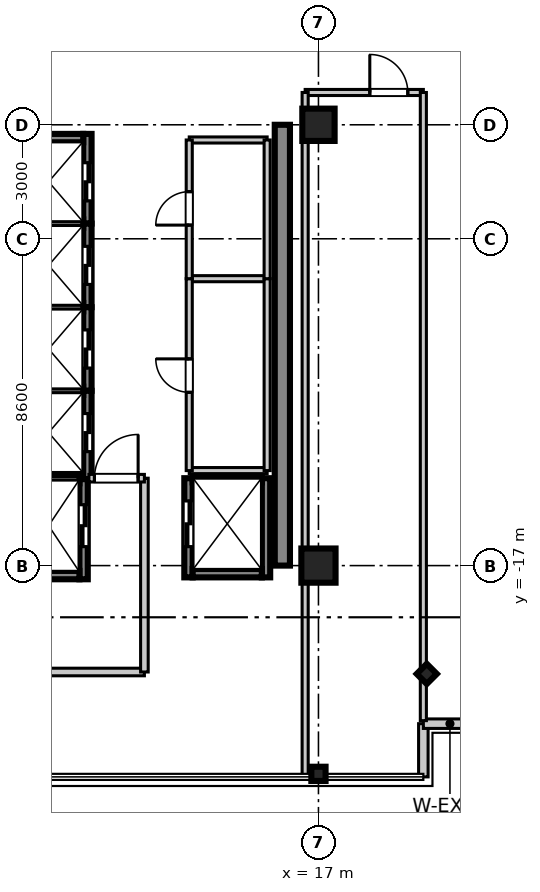
"""IFC4 building model, lengths in metres.
Left out: names, types, materials, properties, quantities, classifications, styles, units other than length and angle.
Written with IfcOpenShell. Run it as: python <this file> out.ifc"""

import sys

from ifc_helpers import new_model, si_unit, direction, frame, frame_2d, origin, origin_2d, place, context, subcontext, project, spatial, rectangle, i_section, extrude, source, transform, mapped, element, fill, save


model = new_model("IFC4")
c1 = context("Model", 3, precision=1e-05, world=origin(), true_north=direction((0.0, 1.0)))
c2 = subcontext(c1, "Body", "Model", "MODEL_VIEW")
j1 = project(units=[si_unit("LENGTHUNIT", "METRE"), si_unit("PLANEANGLEUNIT", "RADIAN")], contexts=[c1])
p1 = place(None, origin())
s1 = spatial("IfcSite", under=j1, at=p1, CompositionType="ELEMENT")
p2 = place(p1, origin())
s2 = spatial("IfcBuilding", under=s1, at=p2, CompositionType="ELEMENT")
p3 = place(p2, frame((0.0, 0.0, 304.2)))
s3 = spatial("IfcBuildingStorey", under=s2, at=p3, CompositionType="ELEMENT", Elevation=304.2)
m1 = source(origin(), c2, "Body", "SweptSolid", [
    extrude(rectangle(XDim=0.9, YDim=0.9, at=origin_2d()), origin(), (0.0, 0.0, 1.0), 3.805),
])
p4 = place(p3, frame((17.0, -17.0, 0.0), z_axis=(0.0, 0.0, 1.0), x_axis=(1.0, 0.0, 0.0)))
e1 = element("IfcColumn", 1, at=p4, inside=s3, PredefinedType="COLUMN", context=c2, shape_type="MappedRepresentation", body=[
    mapped(m1, transform((0.0, 0.0, 0.0), scale=1.0)),
])
m2 = source(origin(), c2, "Body", "SweptSolid", [
    extrude(rectangle(XDim=0.85, YDim=0.85, at=origin_2d()), origin(), (0.0, 0.0, 1.0), 3.805),
])
p5 = place(p3, frame((17.0, -5.4, 0.0), z_axis=(0.0, 0.0, 1.0), x_axis=(1.0, 0.0, 0.0)))
e2 = element("IfcColumn", 2, at=p5, inside=s3, PredefinedType="PILASTER", context=c2, shape_type="MappedRepresentation", body=[
    mapped(m2, transform((0.0, 0.0, 0.0), scale=1.0)),
])
m3 = source(origin(), c2, "Body", "SweptSolid", [
    extrude(i_section(OverallWidth=0.374, OverallDepth=0.374, WebThickness=0.014, FlangeThickness=0.023, at=origin_2d()), origin(), (0.0, 0.0, 1.0), 3.805),
])
for number, where, z_axis, x_axis in (
    (3, (17.0, -22.48, 0.0), (0.0, 0.0, 1.0), (0.0, 1.0, 0.0)),
    (4, (19.85, -19.85, 0.0), (0.0, 0.0, 1.0), (0.707, 0.707, 0.0)),
):
    element("IfcColumn", number, at=place(p3, frame(where, z_axis=z_axis, x_axis=x_axis)), inside=s3, PredefinedType="COLUMN", context=c2, shape_type="MappedRepresentation", body=[
        mapped(m3, transform((0.0, 0.0, 0.0), scale=1.0)),
    ])
m4 = source(origin(), c2, "Body", "SweptSolid", [
    extrude(rectangle(XDim=11.6, YDim=0.4, at=frame_2d((5.8, 0.0))), origin(), (0.0, 0.0, 1.0), 3.55),
])
p6 = place(p3, frame((16.05, -17.0, 0.0), z_axis=(0.0, 0.0, 1.0), x_axis=(0.0, 1.0, 0.0)))
e5 = element("IfcWall", 5, at=p6, inside=s3, PredefinedType="SHEAR", context=c2, shape_type="MappedRepresentation", body=[
    mapped(m4, transform((0.0, 0.0, 0.0), scale=1.0)),
])
m5 = source(origin(), c2, "Body", "SweptSolid", [
    extrude(rectangle(XDim=2.36, YDim=0.22, at=frame_2d((1.18, 0.0))), origin(), (0.0, 0.0, 1.0), 3.55),
])
p7 = place(p3, frame((10.92, -8.0, 0.0), z_axis=(0.0, 0.0, 1.0), x_axis=(0.0, 1.0, 0.0)))
e6 = element("IfcWall", 6, at=p7, inside=s3, PredefinedType="SHEAR", context=c2, shape_type="MappedRepresentation", body=[
    mapped(m5, transform((0.0, 0.0, 0.0), scale=1.0)),
])
p8 = place(p7, frame((0.6, 0.0, 0.0)))
e7 = element("IfcOpeningElement", 7, at=p8, cuts=e6, PredefinedType="OPENING", context=c2, shape_type="SweptSolid", body=[
    extrude(rectangle(XDim=1.0, YDim=2.2, at=frame_2d((0.5, 1.1))), frame((0.0, 0.12, 0.0), z_axis=(0.0, -1.0, 0.0), x_axis=(1.0, 0.0, 0.0)), (0.0, 0.0, 1.0), 0.24),
])
m6 = source(origin(), c2, "Body", "SweptSolid", [
    extrude(rectangle(XDim=1.82, YDim=0.22, at=frame_2d((0.91, 0.0))), origin(), (0.0, 0.0, 1.0), 3.55),
])
p9 = place(p3, frame((8.99, -5.75, 0.0), z_axis=(0.0, 0.0, 1.0), x_axis=(1.0, 0.0, 0.0)))
e8 = element("IfcWall", 8, at=p9, inside=s3, PredefinedType="SHEAR", context=c2, shape_type="MappedRepresentation", body=[
    mapped(m6, transform((0.0, 0.0, 0.0), scale=1.0)),
])
m7 = source(origin(), c2, "Body", "SweptSolid", [
    extrude(rectangle(XDim=2.2, YDim=0.22, at=frame_2d((1.1, 0.0))), origin(), (0.0, 0.0, 1.0), 3.55),
])
p10 = place(p3, frame((10.92, -10.2, 0.0), z_axis=(0.0, 0.0, 1.0), x_axis=(0.0, 1.0, 0.0)))
e9 = element("IfcWall", 9, at=p10, inside=s3, PredefinedType="SHEAR", context=c2, shape_type="MappedRepresentation", body=[
    mapped(m7, transform((0.0, 0.0, 0.0), scale=1.0)),
])
p11 = place(p10, frame((0.6, 0.0, 0.0)))
e10 = element("IfcOpeningElement", 10, at=p11, cuts=e9, PredefinedType="OPENING", context=c2, shape_type="SweptSolid", body=[
    extrude(rectangle(XDim=1.0, YDim=2.2, at=frame_2d((0.5, 1.1))), frame((0.0, 0.12, 0.0), z_axis=(0.0, -1.0, 0.0), x_axis=(1.0, 0.0, 0.0)), (0.0, 0.0, 1.0), 0.24),
])
m8 = source(origin(), c2, "Body", "SweptSolid", [
    extrude(rectangle(XDim=1.82, YDim=0.22, at=frame_2d((0.91, 0.0))), origin(), (0.0, 0.0, 1.0), 3.85),
])
p12 = place(p3, frame((8.99, -8.0, 0.0), z_axis=(0.0, 0.0, 1.0), x_axis=(1.0, 0.0, 0.0)))
e11 = element("IfcWall", 11, at=p12, inside=s3, PredefinedType="SHEAR", context=c2, shape_type="MappedRepresentation", body=[
    mapped(m8, transform((0.0, 0.0, 0.0), scale=1.0)),
])
p13 = place(p3, frame((10.92, -12.4, 0.0), z_axis=(0.0, 0.0, 1.0), x_axis=(0.0, 1.0, 0.0)))
e12 = element("IfcWall", 12, at=p13, inside=s3, PredefinedType="SHEAR", context=c2, shape_type="MappedRepresentation", body=[
    mapped(m7, transform((0.0, 0.0, 0.0), scale=1.0)),
])
p14 = place(p13, frame((0.6, 0.0, 0.0)))
e13 = element("IfcOpeningElement", 13, at=p14, cuts=e12, PredefinedType="OPENING", context=c2, shape_type="SweptSolid", body=[
    extrude(rectangle(XDim=1.0, YDim=2.2, at=frame_2d((0.5, 1.1))), frame((0.0, 0.12, 0.0), z_axis=(0.0, -1.0, 0.0), x_axis=(1.0, 0.0, 0.0)), (0.0, 0.0, 1.0), 0.24),
])
p15 = place(p3, frame((8.99, -10.2, 0.0), z_axis=(0.0, 0.0, 1.0), x_axis=(1.0, 0.0, 0.0)))
e14 = element("IfcWall", 14, at=p15, inside=s3, PredefinedType="SHEAR", context=c2, shape_type="MappedRepresentation", body=[
    mapped(m8, transform((0.0, 0.0, 0.0), scale=1.0)),
])
m9 = source(origin(), c2, "Body", "SweptSolid", [
    extrude(rectangle(XDim=2.325, YDim=0.22, at=frame_2d((1.163, 0.0))), origin(), (0.0, 0.0, 1.0), 3.55),
])
p16 = place(p3, frame((10.92, -14.725, 0.0), z_axis=(0.0, 0.0, 1.0), x_axis=(0.0, 1.0, 0.0)))
e15 = element("IfcWall", 15, at=p16, inside=s3, PredefinedType="SHEAR", context=c2, shape_type="MappedRepresentation", body=[
    mapped(m9, transform((0.0, 0.0, 0.0), scale=1.0)),
])
p17 = place(p16, frame((0.725, 0.0, 0.0)))
e16 = element("IfcOpeningElement", 16, at=p17, cuts=e15, PredefinedType="OPENING", context=c2, shape_type="SweptSolid", body=[
    extrude(rectangle(XDim=1.0, YDim=2.2, at=frame_2d((0.5, 1.1))), frame((0.0, 0.12, 0.0), z_axis=(0.0, -1.0, 0.0), x_axis=(1.0, 0.0, 0.0)), (0.0, 0.0, 1.0), 0.24),
])
p18 = place(p3, frame((8.99, -12.4, 0.0), z_axis=(0.0, 0.0, 1.0), x_axis=(1.0, 0.0, 0.0)))
e17 = element("IfcWall", 17, at=p18, inside=s3, PredefinedType="SHEAR", context=c2, shape_type="MappedRepresentation", body=[
    mapped(m8, transform((0.0, 0.0, 0.0), scale=1.0)),
])
m10 = source(origin(), c2, "Body", "SweptSolid", [
    extrude(rectangle(XDim=2.635, YDim=0.22, at=frame_2d((1.317, 0.0))), origin(), (0.0, 0.0, 1.0), 3.55),
])
p19 = place(p3, frame((10.82, -17.36, 0.0), z_axis=(0.0, 0.0, 1.0), x_axis=(0.0, 1.0, 0.0)))
e18 = element("IfcWall", 18, at=p19, inside=s3, PredefinedType="SHEAR", context=c2, shape_type="MappedRepresentation", body=[
    mapped(m10, transform((0.0, 0.0, 0.0), scale=1.0)),
])
p20 = place(p19, frame((0.86, 0.0, 0.0)))
e19 = element("IfcOpeningElement", 19, at=p20, cuts=e18, PredefinedType="OPENING", context=c2, shape_type="SweptSolid", body=[
    extrude(rectangle(XDim=1.1, YDim=2.2, at=frame_2d((0.55, 1.1))), frame((0.0, 0.12, 0.0), z_axis=(0.0, -1.0, 0.0), x_axis=(1.0, 0.0, 0.0)), (0.0, 0.0, 1.0), 0.24),
])
m11 = source(origin(), c2, "Body", "SweptSolid", [
    extrude(rectangle(XDim=1.62, YDim=0.22, at=frame_2d((0.81, 0.0))), origin(), (0.0, 0.0, 1.0), 3.55),
])
p21 = place(p3, frame((9.09, -17.25, 0.0), z_axis=(0.0, 0.0, 1.0), x_axis=(1.0, 0.0, 0.0)))
e20 = element("IfcWall", 20, at=p21, inside=s3, PredefinedType="SHEAR", context=c2, shape_type="MappedRepresentation", body=[
    mapped(m11, transform((0.0, 0.0, 0.0), scale=1.0)),
])
m12 = source(origin(), c2, "Body", "SweptSolid", [
    extrude(rectangle(XDim=1.62, YDim=0.22, at=frame_2d((0.81, 0.0))), origin(), (0.0, 0.0, 1.0), 3.85),
])
p22 = place(p3, frame((9.09, -14.725, 0.0), z_axis=(0.0, 0.0, 1.0), x_axis=(1.0, 0.0, 0.0)))
e21 = element("IfcWall", 21, at=p22, inside=s3, PredefinedType="SHEAR", context=c2, shape_type="MappedRepresentation", body=[
    mapped(m12, transform((0.0, 0.0, 0.0), scale=1.0)),
])
m13 = source(origin(), c2, "Body", "SweptSolid", [
    extrude(rectangle(XDim=2.61, YDim=0.22, at=frame_2d((1.305, 0.0))), origin(), (0.0, 0.0, 1.0), 3.55),
])
p23 = place(p3, frame((13.58, -17.31, 0.0), z_axis=(0.0, 0.0, 1.0), x_axis=(0.0, 1.0, 0.0)))
e22 = element("IfcWall", 22, at=p23, inside=s3, PredefinedType="SHEAR", context=c2, shape_type="MappedRepresentation", body=[
    mapped(m13, transform((0.0, 0.0, 0.0), scale=1.0)),
])
p24 = place(p23, frame((0.81, 0.0, 0.0)))
e23 = element("IfcOpeningElement", 23, at=p24, cuts=e22, PredefinedType="OPENING", context=c2, shape_type="SweptSolid", body=[
    extrude(rectangle(XDim=1.2, YDim=2.2, at=frame_2d((0.6, 1.1))), frame((0.0, 0.12, 0.0), z_axis=(0.0, -1.0, 0.0), x_axis=(1.0, 0.0, 0.0)), (0.0, 0.0, 1.0), 0.24),
])
p25 = place(p3, frame((15.62, -17.31, 0.0), z_axis=(0.0, 0.0, 1.0), x_axis=(0.0, 1.0, 0.0)))
e24 = element("IfcWall", 24, at=p25, inside=s3, PredefinedType="SHEAR", context=c2, shape_type="MappedRepresentation", body=[
    mapped(m13, transform((0.0, 0.0, 0.0), scale=1.0)),
])
p26 = place(p3, frame((13.69, -17.2, 0.0), z_axis=(0.0, 0.0, 1.0), x_axis=(1.0, 0.0, 0.0)))
e25 = element("IfcWall", 25, at=p26, inside=s3, PredefinedType="SHEAR", context=c2, shape_type="MappedRepresentation", body=[
    mapped(m6, transform((0.0, 0.0, 0.0), scale=1.0)),
])
p27 = place(p3, frame((13.69, -14.7, 0.0), z_axis=(0.0, 0.0, 1.0), x_axis=(1.0, 0.0, 0.0)))
e26 = element("IfcWall", 26, at=p27, inside=s3, PredefinedType="SHEAR", context=c2, shape_type="MappedRepresentation", body=[
    mapped(m8, transform((0.0, 0.0, 0.0), scale=1.0)),
])
m14 = source(origin(), c2, "Body", "SweptSolid", [
    extrude(rectangle(XDim=1.4, YDim=0.25, at=frame_2d((0.7, 0.0))), origin(), (0.0, 0.0, 1.0), 3.55),
])
p28 = place(p3, frame((19.76, -22.56, 0.0), z_axis=(0.0, 0.0, 1.0), x_axis=(0.0, 1.0, 0.0)))
e27 = element("IfcWall", 27, at=p28, inside=s3, PredefinedType="STANDARD", context=c2, shape_type="MappedRepresentation", body=[
    mapped(m14, transform((0.0, 0.0, 0.0), scale=1.0)),
])
m15 = source(origin(), c2, "Body", "SweptSolid", [
    extrude(rectangle(XDim=1.4, YDim=0.25, at=frame_2d((0.7, 0.0))), origin(), (0.0, 0.0, 1.0), 3.55),
])
p29 = place(p3, frame((19.76, -21.16, 0.0), z_axis=(0.0, 0.0, 1.0), x_axis=(1.0, 0.0, 0.0)))
e28 = element("IfcWall", 28, at=p29, inside=s3, PredefinedType="STANDARD", context=c2, shape_type="MappedRepresentation", body=[
    mapped(m15, transform((0.0, 0.0, 0.0), scale=1.0)),
])
m16 = source(origin(), c2, "Body", "SweptSolid", [
    extrude(rectangle(XDim=5.82, YDim=0.2, at=frame_2d((2.91, 0.0))), origin(), (0.0, 0.0, 1.0), 2.89),
])
p30 = place(p3, frame((6.6, -19.8, 0.0), z_axis=(0.0, 0.0, 1.0), x_axis=(1.0, 0.0, 0.0)))
e29 = element("IfcWall", 29, at=p30, inside=s3, PredefinedType="PARTITIONING", context=c2, shape_type="MappedRepresentation", body=[
    mapped(m16, transform((0.0, 0.0, 0.0), scale=1.0)),
])
m17 = source(origin(), c2, "Body", "SweptSolid", [
    extrude(rectangle(XDim=5.1, YDim=0.2, at=frame_2d((2.55, 0.0))), origin(), (0.0, 0.0, 1.0), 2.89),
])
p31 = place(p3, frame((12.42, -19.8, 0.0), z_axis=(0.0, 0.0, 1.0), x_axis=(0.0, 1.0, 0.0)))
e30 = element("IfcWall", 30, at=p31, inside=s3, PredefinedType="PARTITIONING", context=c2, shape_type="MappedRepresentation", body=[
    mapped(m17, transform((0.0, 0.0, 0.0), scale=1.0)),
])
m18 = source(origin(), c2, "Body", "SweptSolid", [
    extrude(rectangle(XDim=1.46, YDim=0.2, at=frame_2d((0.73, 0.0))), origin(), (0.0, 0.0, 1.0), 2.89),
])
p32 = place(p3, frame((10.96, -14.7, 0.0), z_axis=(0.0, 0.0, 1.0), x_axis=(1.0, 0.0, 0.0)))
e31 = element("IfcWall", 31, at=p32, inside=s3, PredefinedType="PARTITIONING", context=c2, shape_type="MappedRepresentation", body=[
    mapped(m18, transform((0.0, 0.0, 0.0), scale=1.0)),
])
p33 = place(p32, frame((0.145, 0.0, 0.0)))
e32 = element("IfcOpeningElement", 32, at=p33, cuts=e31, PredefinedType="OPENING", context=c2, shape_type="SweptSolid", body=[
    extrude(rectangle(XDim=1.15, YDim=2.15, at=frame_2d((0.575, 1.075))), frame((0.0, 0.11, 0.0), z_axis=(0.0, -1.0, 0.0), x_axis=(1.0, 0.0, 0.0)), (0.0, 0.0, 1.0), 0.22),
])
m19 = source(origin(), c2, "Body", "SweptSolid", [
    extrude(rectangle(XDim=2.05, YDim=0.16, at=frame_2d((1.025, 0.0))), origin(), (0.0, 0.0, 1.0), 2.89),
])
for number, where, z_axis, x_axis in (
    (33, (13.6, -14.5, 0.0), (0.0, 0.0, 1.0), (1.0, 0.0, 0.0)),
    (34, (13.6, -9.45, 0.0), (0.0, 0.0, 1.0), (1.0, 0.0, 0.0)),
):
    element("IfcWall", number, at=place(p3, frame(where, z_axis=z_axis, x_axis=x_axis)), inside=s3, PredefinedType="PARTITIONING", context=c2, shape_type="MappedRepresentation", body=[
        mapped(m19, transform((0.0, 0.0, 0.0), scale=1.0)),
    ])
m20 = source(origin(), c2, "Body", "SweptSolid", [
    extrude(rectangle(XDim=5.05, YDim=0.16, at=frame_2d((2.525, 0.0))), origin(), (0.0, 0.0, 1.0), 2.89),
])
p34 = place(p3, frame((13.6, -14.5, 0.0), z_axis=(0.0, 0.0, 1.0), x_axis=(0.0, 1.0, 0.0)))
e35 = element("IfcWall", 35, at=p34, inside=s3, PredefinedType="PARTITIONING", context=c2, shape_type="MappedRepresentation", body=[
    mapped(m20, transform((0.0, 0.0, 0.0), scale=1.0)),
])
p35 = place(p34, frame((2.06, 0.0, 0.0)))
e36 = element("IfcOpeningElement", 36, at=p35, cuts=e35, PredefinedType="OPENING", context=c2, shape_type="SweptSolid", body=[
    extrude(rectangle(XDim=0.88, YDim=2.1, at=frame_2d((0.44, 1.05))), frame((0.0, 0.09, 0.0), z_axis=(0.0, -1.0, 0.0), x_axis=(1.0, 0.0, 0.0)), (0.0, 0.0, 1.0), 0.18),
])
p36 = place(p3, frame((15.65, -14.5, 0.0), z_axis=(0.0, 0.0, 1.0), x_axis=(0.0, 1.0, 0.0)))
e37 = element("IfcWall", 37, at=p36, inside=s3, PredefinedType="PARTITIONING", context=c2, shape_type="MappedRepresentation", body=[
    mapped(m20, transform((0.0, 0.0, 0.0), scale=1.0)),
])
p37 = place(p3, frame((13.6, -5.8, 0.0), z_axis=(0.0, 0.0, 1.0), x_axis=(1.0, 0.0, 0.0)))
e38 = element("IfcWall", 38, at=p37, inside=s3, PredefinedType="PARTITIONING", context=c2, shape_type="MappedRepresentation", body=[
    mapped(m19, transform((0.0, 0.0, 0.0), scale=1.0)),
])
m21 = source(origin(), c2, "Body", "SweptSolid", [
    extrude(rectangle(XDim=3.65, YDim=0.16, at=frame_2d((1.825, 0.0))), origin(), (0.0, 0.0, 1.0), 2.89),
])
p38 = place(p3, frame((13.6, -9.45, 0.0), z_axis=(0.0, 0.0, 1.0), x_axis=(0.0, 1.0, 0.0)))
e39 = element("IfcWall", 39, at=p38, inside=s3, PredefinedType="PARTITIONING", context=c2, shape_type="MappedRepresentation", body=[
    mapped(m21, transform((0.0, 0.0, 0.0), scale=1.0)),
])
p39 = place(p38, frame((1.41, 0.0, 0.0)))
e40 = element("IfcOpeningElement", 40, at=p39, cuts=e39, PredefinedType="OPENING", context=c2, shape_type="SweptSolid", body=[
    extrude(rectangle(XDim=0.88, YDim=2.1, at=frame_2d((0.44, 1.05))), frame((0.0, 0.09, 0.0), z_axis=(0.0, -1.0, 0.0), x_axis=(1.0, 0.0, 0.0)), (0.0, 0.0, 1.0), 0.18),
])
p40 = place(p3, frame((15.65, -9.45, 0.0), z_axis=(0.0, 0.0, 1.0), x_axis=(0.0, 1.0, 0.0)))
e41 = element("IfcWall", 41, at=p40, inside=s3, PredefinedType="PARTITIONING", context=c2, shape_type="MappedRepresentation", body=[
    mapped(m21, transform((0.0, 0.0, 0.0), scale=1.0)),
])
m22 = source(origin(), c2, "Body", "SweptSolid", [
    extrude(rectangle(XDim=3.11, YDim=0.16, at=frame_2d((1.555, 0.0))), origin(), (0.0, 0.0, 1.0), 2.89),
])
p41 = place(p3, frame((16.65, -4.55, 0.0), z_axis=(0.0, 0.0, 1.0), x_axis=(1.0, 0.0, 0.0)))
e42 = element("IfcWall", 42, at=p41, inside=s3, PredefinedType="PARTITIONING", context=c2, shape_type="MappedRepresentation", body=[
    mapped(m22, transform((0.0, 0.0, 0.0), scale=1.0)),
])
p42 = place(p41, frame((1.701, 0.0, 0.0)))
e43 = element("IfcOpeningElement", 43, at=p42, cuts=e42, PredefinedType="OPENING", context=c2, shape_type="SweptSolid", body=[
    extrude(rectangle(XDim=1.0, YDim=2.1, at=frame_2d((0.5, 1.05))), frame((0.0, 0.09, 0.0), z_axis=(0.0, -1.0, 0.0), x_axis=(1.0, 0.0, 0.0)), (0.0, 0.0, 1.0), 0.18),
])
m23 = source(origin(), c2, "Body", "SweptSolid", [
    extrude(rectangle(XDim=17.95, YDim=0.16, at=frame_2d((8.975, 0.0))), origin(), (0.0, 0.0, 1.0), 2.89),
])
p43 = place(p3, frame((16.65, -22.5, 0.0), z_axis=(0.0, 0.0, 1.0), x_axis=(0.0, 1.0, 0.0)))
e44 = element("IfcWall", 44, at=p43, inside=s3, PredefinedType="PARTITIONING", context=c2, shape_type="MappedRepresentation", body=[
    mapped(m23, transform((0.0, 0.0, 0.0), scale=1.0)),
])
m24 = source(origin(), c2, "Body", "SweptSolid", [
    extrude(rectangle(XDim=16.53, YDim=0.16, at=frame_2d((8.265, 0.0))), origin(), (0.0, 0.0, 1.0), 2.89),
])
p44 = place(p3, frame((19.76, -21.08, 0.0), z_axis=(0.0, 0.0, 1.0), x_axis=(0.0, 1.0, 0.0)))
e45 = element("IfcWall", 45, at=p44, inside=s3, PredefinedType="PARTITIONING", context=c2, shape_type="MappedRepresentation", body=[
    mapped(m24, transform((0.0, 0.0, 0.0), scale=1.0)),
])
m25 = source(origin(), c2, "Body", "SweptSolid", [
    extrude(rectangle(XDim=1.0, YDim=2.2, at=frame_2d((0.5, 1.1))), frame((0.0, 0.025, 0.0), z_axis=(0.0, -1.0, 0.0), x_axis=(1.0, 0.0, 0.0)), (0.0, 0.0, 1.0), 0.05),
])
p45 = place(p8, frame((1.0, 0.0, 0.0), z_axis=(0.0, 0.0, 1.0), x_axis=(-1.0, 0.0, 0.0)))
e46 = element("IfcDoor", 46, at=p45, inside=s3, OperationType="DOUBLE_DOOR_SLIDING", PredefinedType="DOOR", context=c2, shape_type="MappedRepresentation", body=[
    mapped(m25, transform((0.0, 0.0, 0.0), scale=1.0)),
])
fill(e7, e46)
p46 = place(p11, frame((1.0, 0.0, 0.0), z_axis=(0.0, 0.0, 1.0), x_axis=(-1.0, 0.0, 0.0)))
e47 = element("IfcDoor", 47, at=p46, inside=s3, OperationType="DOUBLE_DOOR_SLIDING", PredefinedType="DOOR", context=c2, shape_type="MappedRepresentation", body=[
    mapped(m25, transform((0.0, 0.0, 0.0), scale=1.0)),
])
fill(e10, e47)
p47 = place(p14, frame((1.0, 0.0, 0.0), z_axis=(0.0, 0.0, 1.0), x_axis=(-1.0, 0.0, 0.0)))
e48 = element("IfcDoor", 48, at=p47, inside=s3, OperationType="DOUBLE_DOOR_SLIDING", PredefinedType="DOOR", context=c2, shape_type="MappedRepresentation", body=[
    mapped(m25, transform((0.0, 0.0, 0.0), scale=1.0)),
])
fill(e13, e48)
p48 = place(p17, frame((1.0, 0.0, 0.0), z_axis=(0.0, 0.0, 1.0), x_axis=(-1.0, 0.0, 0.0)))
e49 = element("IfcDoor", 49, at=p48, inside=s3, OperationType="DOUBLE_DOOR_SLIDING", PredefinedType="DOOR", context=c2, shape_type="MappedRepresentation", body=[
    mapped(m25, transform((0.0, 0.0, 0.0), scale=1.0)),
])
fill(e16, e49)
m26 = source(origin(), c2, "Body", "SweptSolid", [
    extrude(rectangle(XDim=1.1, YDim=2.2, at=frame_2d((0.55, 1.1))), frame((0.0, 0.025, 0.0), z_axis=(0.0, -1.0, 0.0), x_axis=(1.0, 0.0, 0.0)), (0.0, 0.0, 1.0), 0.05),
])
p49 = place(p20, frame((1.1, 0.0, 0.0), z_axis=(0.0, 0.0, 1.0), x_axis=(-1.0, 0.0, 0.0)))
e50 = element("IfcDoor", 50, at=p49, inside=s3, OperationType="DOUBLE_DOOR_SLIDING", PredefinedType="DOOR", context=c2, shape_type="MappedRepresentation", body=[
    mapped(m26, transform((0.0, 0.0, 0.0), scale=1.0)),
])
fill(e19, e50)
m27 = source(origin(), c2, "Body", "SweptSolid", [
    extrude(rectangle(XDim=1.2, YDim=2.2, at=frame_2d((0.6, 1.1))), frame((0.0, 0.025, 0.0), z_axis=(0.0, -1.0, 0.0), x_axis=(1.0, 0.0, 0.0)), (0.0, 0.0, 1.0), 0.05),
])
p50 = place(p24, origin())
e51 = element("IfcDoor", 51, at=p50, inside=s3, OperationType="DOUBLE_DOOR_SLIDING", PredefinedType="DOOR", context=c2, shape_type="MappedRepresentation", body=[
    mapped(m27, transform((0.0, 0.0, 0.0), scale=1.0)),
])
fill(e23, e51)
m28 = source(origin(), c2, "Body", "SweptSolid", [
    extrude(rectangle(XDim=1.15, YDim=2.15, at=frame_2d((0.575, 1.075))), frame((0.0, 0.025, 0.0), z_axis=(0.0, -1.0, 0.0), x_axis=(1.0, 0.0, 0.0)), (0.0, 0.0, 1.0), 0.05),
])
p51 = place(p33, origin())
e52 = element("IfcDoor", 52, at=p51, inside=s3, OperationType="SINGLE_SWING_RIGHT", PredefinedType="DOOR", context=c2, shape_type="MappedRepresentation", body=[
    mapped(m28, transform((0.0, 0.0, 0.0), scale=1.0)),
])
fill(e32, e52)
m29 = source(origin(), c2, "Body", "SweptSolid", [
    extrude(rectangle(XDim=0.88, YDim=2.1, at=frame_2d((0.44, 1.05))), frame((0.0, 0.025, 0.0), z_axis=(0.0, -1.0, 0.0), x_axis=(1.0, 0.0, 0.0)), (0.0, 0.0, 1.0), 0.05),
])
p52 = place(p35, frame((0.88, 0.0, 0.0), z_axis=(0.0, 0.0, 1.0), x_axis=(-1.0, 0.0, 0.0)))
e53 = element("IfcDoor", 53, at=p52, inside=s3, OperationType="SINGLE_SWING_RIGHT", PredefinedType="DOOR", context=c2, shape_type="MappedRepresentation", body=[
    mapped(m29, transform((0.0, 0.0, 0.0), scale=1.0)),
])
fill(e36, e53)
p53 = place(p39, frame((0.88, 0.0, 0.0), z_axis=(0.0, 0.0, 1.0), x_axis=(-1.0, 0.0, 0.0)))
e54 = element("IfcDoor", 54, at=p53, inside=s3, OperationType="SINGLE_SWING_LEFT", PredefinedType="DOOR", context=c2, shape_type="MappedRepresentation", body=[
    mapped(m29, transform((0.0, 0.0, 0.0), scale=1.0)),
])
fill(e40, e54)
m30 = source(origin(), c2, "Body", "SweptSolid", [
    extrude(rectangle(XDim=1.0, YDim=2.1, at=frame_2d((0.5, 1.05))), frame((0.0, 0.025, 0.0), z_axis=(0.0, -1.0, 0.0), x_axis=(1.0, 0.0, 0.0)), (0.0, 0.0, 1.0), 0.05),
])
p54 = place(p42, frame((1.0, 0.0, 0.0), z_axis=(0.0, 0.0, 1.0), x_axis=(-1.0, 0.0, 0.0)))
e55 = element("IfcDoor", 55, at=p54, inside=s3, OperationType="SINGLE_SWING_LEFT", PredefinedType="DOOR", context=c2, shape_type="MappedRepresentation", body=[
    mapped(m30, transform((0.0, 0.0, 0.0), scale=1.0)),
])
fill(e43, e55)
save(model, sys.argv[1])
